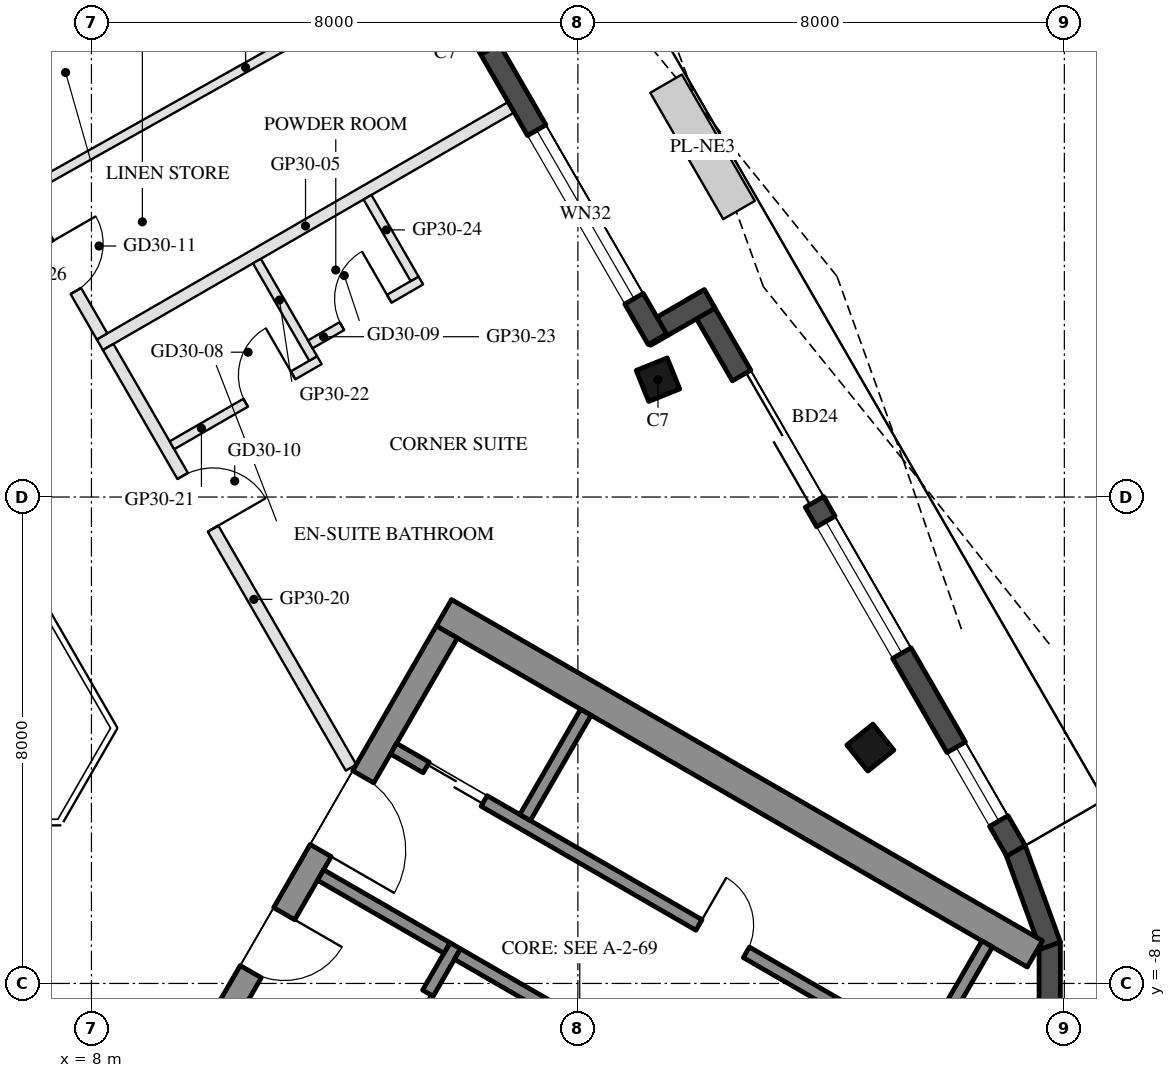
"""IFC4 building model, lengths in metres.
Left out: names, types, materials, properties, quantities, classifications, styles, units other than length and angle.
Written with IfcOpenShell. Run it as: python <this file> out.ifc"""

import sys

from ifc_helpers import new_model, si_unit, direction, frame, frame_2d, origin, origin_2d, place, context, subcontext, project, spatial, rectangle, hollow_rectangle, extrude, boolean, halfspace, element, fill, save


model = new_model("IFC4")
c1 = context("Model", 3, precision=1e-05, world=origin(), true_north=direction((0.0, 1.0)))
c2 = subcontext(c1, "Body", "Model", "MODEL_VIEW")
j1 = project(units=[si_unit("LENGTHUNIT", "METRE"), si_unit("PLANEANGLEUNIT", "RADIAN")], contexts=[c1])
p1 = place(None, origin())
s1 = spatial("IfcSite", under=j1, at=p1, CompositionType="ELEMENT")
p2 = place(p1, origin())
s2 = spatial("IfcBuilding", under=s1, at=p2, CompositionType="ELEMENT")
p3 = place(p2, frame((0.0, 0.0, 298.5)))
s3 = spatial("IfcBuildingStorey", under=s2, at=p3, CompositionType="ELEMENT", Elevation=298.5)
p4 = place(p3, frame((20.81, -4.121, 0.0), z_axis=(-0.190735837279, 0.02958801006, 0.981195388309), x_axis=(0.488489055842, -0.864137452388, 0.121016138189)))
e1 = element("IfcColumn", 1, at=p4, inside=s3, PredefinedType="COLUMN", context=c2, shape_type="SweptSolid", body=[
    boolean("DIFFERENCE", boolean("DIFFERENCE", extrude(hollow_rectangle(XDim=0.55, YDim=0.55, WallThickness=0.025, at=origin_2d()), origin(), (0.0, 0.0, 1.0), 3.771), halfspace(frame((0.0, 0.0, 0.04), z_axis=(0.0, 0.0, 1.0), x_axis=(1.0, 0.0, 0.0)), True)), halfspace(frame((0.0, 0.0, 3.731), z_axis=(0.0, 0.0, 1.0), x_axis=(1.0, 0.0, 0.0)), False)),
])
p5 = place(p3, frame((17.317, 1.93, 0.0), z_axis=(-0.161388759957, -0.022850929707, 0.98662632398), x_axis=(0.494767653448, -0.866891976592, 0.060854498787)))
e2 = element("IfcColumn", 2, at=p5, inside=s3, PredefinedType="COLUMN", context=c2, shape_type="SweptSolid", body=[
    boolean("DIFFERENCE", boolean("DIFFERENCE", extrude(hollow_rectangle(XDim=0.55, YDim=0.55, WallThickness=0.025, at=origin_2d()), origin(), (0.0, 0.0, 1.0), 3.75), halfspace(frame((0.0, 0.0, 0.034), z_axis=(0.0, 0.0, 1.0), x_axis=(1.0, 0.0, 0.0)), True)), halfspace(frame((0.0, 0.0, 3.716), z_axis=(0.0, 0.0, 1.0), x_axis=(1.0, 0.0, 0.0)), False)),
])
for number, where, z_axis, x_axis in (
    (3, (23.759, -9.008, 0.0), (0.0, 0.0, 1.0), (0.0, 1.0, 0.0)),
    (4, (23.77, -7.379, 0.0), (0.0, 0.0, 1.0), (-0.342, 0.94, 0.0)),
):
    element("IfcWall", number, at=place(p3, frame(where, z_axis=z_axis, x_axis=x_axis)), inside=s3, PredefinedType="SOLIDWALL", context=c2, shape_type="SweptSolid", body=[
        extrude(rectangle(XDim=1.689, YDim=0.35, at=frame_2d((0.845, 0.0))), origin(), (0.0, 0.0, 1.0), 3.55),
    ])
p6 = place(p3, frame((23.205, -5.819, 0.0), z_axis=(0.0, 0.0, 1.0), x_axis=(-0.500010118922, 0.866019561543, 0.0)))
e5 = element("IfcWall", 5, at=p6, inside=s3, PredefinedType="SOLIDWALL", context=c2, shape_type="SweptSolid", body=[
    extrude(rectangle(XDim=10.554, YDim=0.35, at=frame_2d((5.277, 0.0))), origin(), (0.0, 0.0, 1.0), 3.55),
])
p7 = place(p6, frame((0.566, 0.0, 0.3)))
e6 = element("IfcOpeningElement", 6, at=p7, cuts=e5, PredefinedType="OPENING", context=c2, shape_type="SweptSolid", body=[
    extrude(rectangle(XDim=1.4, YDim=2.65, at=frame_2d((0.7, 1.325))), frame((0.0, 0.185, 0.0), z_axis=(0.0, -1.0, 0.0), x_axis=(1.0, 0.0, 0.0)), (0.0, 0.0, 1.0), 0.37),
])
p8 = place(p6, frame((6.626, 0.0, 0.0)))
e7 = element("IfcOpeningElement", 7, at=p8, cuts=e5, PredefinedType="OPENING", context=c2, shape_type="SweptSolid", body=[
    extrude(rectangle(XDim=2.4, YDim=2.4, at=frame_2d((1.2, 1.2))), frame((0.0, 0.185, 0.0), z_axis=(0.0, -1.0, 0.0), x_axis=(1.0, 0.0, 0.0)), (0.0, 0.0, 1.0), 0.37),
])
p9 = place(p6, frame((3.754, 0.0, 0.3)))
e8 = element("IfcOpeningElement", 8, at=p9, cuts=e5, PredefinedType="OPENING", context=c2, shape_type="SweptSolid", body=[
    extrude(rectangle(XDim=2.5, YDim=2.65, at=frame_2d((1.25, 1.325))), frame((0.0, 0.185, 0.0), z_axis=(0.0, -1.0, 0.0), x_axis=(1.0, 0.0, 0.0)), (0.0, 0.0, 1.0), 0.37),
])
p10 = place(p3, frame((18.167, 3.258, 0.0), z_axis=(0.0, 0.0, 1.0), x_axis=(-0.866005645448, -0.500034220881, 0.0)))
e9 = element("IfcWall", 9, at=p10, inside=s3, PredefinedType="SOLIDWALL", context=c2, shape_type="SweptSolid", body=[
    extrude(rectangle(XDim=1.22, YDim=0.35, at=frame_2d((0.61, 0.0))), origin(), (0.0, 0.0, 1.0), 3.55),
])
p11 = place(p3, frame((17.308, 2.595, 0.0), z_axis=(0.0, 0.0, 1.0), x_axis=(-0.500005339912, 0.866022320763, 0.0)))
e10 = element("IfcWall", 10, at=p11, inside=s3, PredefinedType="SOLIDWALL", context=c2, shape_type="SweptSolid", body=[
    extrude(rectangle(XDim=5.827, YDim=0.35, at=frame_2d((2.914, 0.0))), origin(), (0.0, 0.0, 1.0), 3.55),
])
p12 = place(p11, frame((0.77, 0.0, 0.3)))
e11 = element("IfcOpeningElement", 11, at=p12, cuts=e10, PredefinedType="OPENING", context=c2, shape_type="SweptSolid", body=[
    extrude(rectangle(XDim=3.2, YDim=2.65, at=frame_2d((1.6, 1.325))), frame((0.0, 0.185, 0.0), z_axis=(0.0, -1.0, 0.0), x_axis=(1.0, 0.0, 0.0)), (0.0, 0.0, 1.0), 0.37),
])
p13 = place(p3, frame((14.342, 7.443, 0.0), z_axis=(0.0, 0.0, 1.0), x_axis=(0.866092288191, 0.499884134912, 0.0)))
e12 = element("IfcWall", 12, at=p13, inside=s3, PredefinedType="SOLIDWALL", context=c2, shape_type="SweptSolid", body=[
    extrude(rectangle(XDim=1.22, YDim=0.35, at=frame_2d((0.61, 0.0))), origin(), (0.0, 0.0, 1.0), 3.55),
])
p14 = place(p3, frame((13.797, -1.903, 0.0), z_axis=(0.0, 0.0, 1.0), x_axis=(0.866025449148, -0.499999921427, 0.0)))
e13 = element("IfcWall", 13, at=p14, inside=s3, PredefinedType="SHEAR", context=c2, shape_type="SweptSolid", body=[
    extrude(rectangle(XDim=11.222, YDim=0.5, at=frame_2d((5.611, 0.0))), origin(), (0.0, 0.0, 1.0), 3.5),
])
p15 = place(p3, frame((8.845, -10.88, 0.0), z_axis=(0.0, 0.0, 1.0), x_axis=(0.500004234368, 0.866022959057, 0.0)))
e14 = element("IfcWall", 14, at=p15, inside=s3, PredefinedType="SHEAR", context=c2, shape_type="SweptSolid", body=[
    extrude(rectangle(XDim=10.0, YDim=0.4, at=frame_2d((5.0, 0.0))), origin(), (0.0, 0.0, 1.0), 3.5),
])
p16 = place(p15, frame((3.55, 0.0, 0.0)))
e15 = element("IfcOpeningElement", 15, at=p16, cuts=e14, PredefinedType="OPENING", context=c2, shape_type="SweptSolid", body=[
    extrude(rectangle(XDim=1.1, YDim=2.1, at=frame_2d((0.55, 1.05))), frame((0.0, 0.21, 0.0), z_axis=(0.0, -1.0, 0.0), x_axis=(1.0, 0.0, 0.0)), (0.0, 0.0, 1.0), 0.42),
])
p17 = place(p15, frame((5.85, 0.0, 0.0)))
e16 = element("IfcOpeningElement", 16, at=p17, cuts=e14, PredefinedType="OPENING", context=c2, shape_type="SweptSolid", body=[
    extrude(rectangle(XDim=1.4, YDim=2.1, at=frame_2d((0.7, 1.05))), frame((0.0, 0.21, 0.0), z_axis=(0.0, -1.0, 0.0), x_axis=(1.0, 0.0, 0.0)), (0.0, 0.0, 1.0), 0.42),
])
p18 = place(p3, frame((12.583, -9.805, 0.0), z_axis=(0.0, 0.0, 1.0), x_axis=(0.49994636267, 0.866056369097, 0.0)))
e17 = element("IfcWall", 17, at=p18, inside=s3, PredefinedType="SHEAR", context=c2, shape_type="SweptSolid", body=[
    extrude(rectangle(XDim=2.8, YDim=0.2, at=frame_2d((1.4, 0.0))), origin(), (0.0, 0.0, 1.0), 3.5),
])
p19 = place(p18, frame((0.7, 0.0, 0.0)))
e18 = element("IfcOpeningElement", 18, at=p19, cuts=e17, PredefinedType="OPENING", context=c2, shape_type="SweptSolid", body=[
    extrude(rectangle(XDim=1.2, YDim=2.1, at=frame_2d((0.6, 1.05))), frame((0.0, 0.11, 0.0), z_axis=(0.0, -1.0, 0.0), x_axis=(1.0, 0.0, 0.0)), (0.0, 0.0, 1.0), 0.22),
])
p20 = place(p3, frame((11.768, -6.217, 0.0), z_axis=(0.0, 0.0, 1.0), x_axis=(0.866050077142, -0.499957262057, 0.0)))
e19 = element("IfcWall", 19, at=p20, inside=s3, PredefinedType="SHEAR", context=c2, shape_type="SweptSolid", body=[
    extrude(rectangle(XDim=2.4, YDim=0.2, at=frame_2d((1.2, 0.0))), origin(), (0.0, 0.0, 1.0), 3.5),
])
p21 = place(p3, frame((14.02, -7.517, 0.0), z_axis=(0.0, 0.0, 1.0), x_axis=(0.866034573852, -0.49998411664, 0.0)))
e20 = element("IfcWall", 20, at=p21, inside=s3, PredefinedType="SHEAR", context=c2, shape_type="SweptSolid", body=[
    extrude(rectangle(XDim=2.8, YDim=0.2, at=frame_2d((1.4, 0.0))), origin(), (0.0, 0.0, 1.0), 3.5),
])
p22 = place(p3, frame((12.968, -4.138, 0.0), z_axis=(0.0, 0.0, 1.0), x_axis=(0.866028328073, -0.49999493495, 0.0)))
e21 = element("IfcWall", 21, at=p22, inside=s3, PredefinedType="SHEAR", context=c2, shape_type="SweptSolid", body=[
    extrude(rectangle(XDim=10.16, YDim=0.2, at=frame_2d((5.08, 0.0))), origin(), (0.0, 0.0, 1.0), 3.5),
])
p23 = place(p22, frame((0.62, 0.0, 0.0)))
e22 = element("IfcOpeningElement", 22, at=p23, cuts=e21, PredefinedType="OPENING", context=c2, shape_type="SweptSolid", body=[
    extrude(rectangle(XDim=1.1, YDim=2.1, at=frame_2d((0.55, 1.05))), frame((0.0, 0.11, 0.0), z_axis=(0.0, -1.0, 0.0), x_axis=(1.0, 0.0, 0.0)), (0.0, 0.0, 1.0), 0.22),
])
p24 = place(p22, frame((5.8, 0.0, 0.0)))
e23 = element("IfcOpeningElement", 23, at=p24, cuts=e21, PredefinedType="OPENING", context=c2, shape_type="SweptSolid", body=[
    extrude(rectangle(XDim=0.9, YDim=2.1, at=frame_2d((0.45, 1.05))), frame((0.0, 0.11, 0.0), z_axis=(0.0, -1.0, 0.0), x_axis=(1.0, 0.0, 0.0)), (0.0, 0.0, 1.0), 0.22),
])
for number, where, z_axis, x_axis in (
    (24, (15.131, -5.272, 0.0), (0.0, 0.0, 1.0), (0.5, 0.866, 0.0)),
    (25, (21.73, -9.082, 0.0), (0.0, 0.0, 1.0), (0.5, 0.866, 0.0)),
):
    element("IfcWall", number, at=place(p3, frame(where, z_axis=z_axis, x_axis=x_axis)), inside=s3, PredefinedType="SHEAR", context=c2, shape_type="SweptSolid", body=[
        extrude(rectangle(XDim=2.0, YDim=0.2, at=frame_2d((1.0, 0.0))), origin(), (0.0, 0.0, 1.0), 3.5),
    ])
p25 = place(p3, frame((14.903, 6.41, 0.0), z_axis=(0.0, 0.0, 1.0), x_axis=(-0.866030491634, -0.499991187483, 0.0)))
e26 = element("IfcWall", 26, at=p25, inside=s3, PredefinedType="PARTITIONING", context=c2, shape_type="SweptSolid", body=[
    extrude(rectangle(XDim=7.812, YDim=0.2, at=frame_2d((3.906, 0.0))), origin(), (0.0, 0.0, 1.0), 3.1),
])
p26 = place(p3, frame((12.986, 11.531, 0.0), z_axis=(0.0, 0.0, 1.0), x_axis=(-0.877887007044, -0.478867834442, 0.0)))
e27 = element("IfcWall", 27, at=p26, inside=s3, PredefinedType="PARTITIONING", context=c2, shape_type="SweptSolid", body=[
    extrude(rectangle(XDim=8.714, YDim=0.2, at=frame_2d((4.357, 0.0))), origin(), (0.0, 0.0, 1.0), 3.1),
])
p27 = place(p3, frame((8.275, 2.468, 0.0), z_axis=(0.0, 0.0, 1.0), x_axis=(0.500004647933, -0.866022720283, 0.0)))
e28 = element("IfcWall", 28, at=p27, inside=s3, PredefinedType="PARTITIONING", context=c2, shape_type="SweptSolid", body=[
    extrude(rectangle(XDim=7.988, YDim=0.2, at=frame_2d((3.994, 0.0))), origin(), (0.0, 0.0, 1.0), 3.1),
])
p28 = place(p27, frame((2.45, 0.0, 0.0)))
e29 = element("IfcOpeningElement", 29, at=p28, cuts=e28, PredefinedType="OPENING", context=c2, shape_type="SweptSolid", body=[
    extrude(rectangle(XDim=1.0, YDim=2.1, at=frame_2d((0.5, 1.05))), frame((0.0, 0.11, 0.0), z_axis=(0.0, -1.0, 0.0), x_axis=(1.0, 0.0, 0.0)), (0.0, 0.0, 1.0), 0.22),
])
p29 = place(p3, frame((9.324, 0.851, 0.0), z_axis=(0.0, 0.0, 1.0), x_axis=(0.865996816683, 0.500049511043, 0.0)))
e30 = element("IfcWall", 30, at=p29, inside=s3, PredefinedType="PARTITIONING", context=c2, shape_type="SweptSolid", body=[
    extrude(rectangle(XDim=2.8, YDim=0.15, at=frame_2d((1.4, 0.0))), origin(), (0.0, 0.0, 1.0), 3.55),
])
p30 = place(p29, frame((1.4, 0.0, 0.0)))
e31 = element("IfcOpeningElement", 31, at=p30, cuts=e30, PredefinedType="OPENING", context=c2, shape_type="SweptSolid", body=[
    extrude(rectangle(XDim=0.9, YDim=2.1, at=frame_2d((0.45, 1.05))), frame((0.0, 0.085, 0.0), z_axis=(0.0, -1.0, 0.0), x_axis=(1.0, 0.0, 0.0)), (0.0, 0.0, 1.0), 0.17),
])
p31 = place(p3, frame((11.646, 2.278, 0.0), z_axis=(0.0, 0.0, 1.0), x_axis=(-0.49994333299, 0.866058118026, 0.0)))
e32 = element("IfcWall", 32, at=p31, inside=s3, PredefinedType="PARTITIONING", context=c2, shape_type="SweptSolid", body=[
    extrude(rectangle(XDim=1.85, YDim=0.15, at=frame_2d((0.925, 0.0))), origin(), (0.0, 0.0, 1.0), 3.1),
])
p32 = place(p3, frame((11.599, 2.511, 0.0), z_axis=(0.0, 0.0, 1.0), x_axis=(0.866009402589, 0.500027713859, 0.0)))
e33 = element("IfcWall", 33, at=p32, inside=s3, PredefinedType="PARTITIONING", context=c2, shape_type="SweptSolid", body=[
    extrude(rectangle(XDim=2.1, YDim=0.15, at=frame_2d((1.05, 0.0))), origin(), (0.0, 0.0, 1.0), 3.55),
])
p33 = place(p32, frame((0.6, 0.0, 0.0)))
e34 = element("IfcOpeningElement", 34, at=p33, cuts=e33, PredefinedType="OPENING", context=c2, shape_type="SweptSolid", body=[
    extrude(rectangle(XDim=0.9, YDim=2.1, at=frame_2d((0.45, 1.05))), frame((0.0, 0.085, 0.0), z_axis=(0.0, -1.0, 0.0), x_axis=(1.0, 0.0, 0.0)), (0.0, 0.0, 1.0), 0.17),
])
p34 = place(p3, frame((13.315, 3.588, 0.0), z_axis=(0.0, 0.0, 1.0), x_axis=(-0.499967891604, 0.866043940782, 0.0)))
e35 = element("IfcWall", 35, at=p34, inside=s3, PredefinedType="PARTITIONING", context=c2, shape_type="SweptSolid", body=[
    extrude(rectangle(XDim=1.55, YDim=0.15, at=frame_2d((0.775, 0.0))), origin(), (0.0, 0.0, 1.0), 3.1),
])
p35 = place(p3, frame((14.334, 9.196, 0.0), z_axis=(0.0, 0.0, 1.0), x_axis=(-0.872016731473, -0.489476066863, 0.0)))
e36 = element("IfcWall", 36, at=p35, inside=s3, PredefinedType="PARTITIONING", context=c2, shape_type="SweptSolid", body=[
    extrude(rectangle(XDim=8.712, YDim=0.15, at=frame_2d((4.356, 0.0))), origin(), (0.0, 0.0, 1.0), 3.1),
])
p36 = place(p3, frame((6.862, 4.916, 0.0), z_axis=(0.0, 0.0, 1.0), x_axis=(0.499958506883, -0.866049358521, 0.0)))
e37 = element("IfcWall", 37, at=p36, inside=s3, PredefinedType="PARTITIONING", context=c2, shape_type="SweptSolid", body=[
    extrude(rectangle(XDim=2.626, YDim=0.2, at=frame_2d((1.313, 0.0))), origin(), (0.0, 0.0, 1.0), 3.1),
])
p37 = place(p36, frame((0.863, 0.0, 0.0)))
e38 = element("IfcOpeningElement", 38, at=p37, cuts=e37, PredefinedType="OPENING", context=c2, shape_type="SweptSolid", body=[
    extrude(rectangle(XDim=0.9, YDim=2.1, at=frame_2d((0.45, 1.05))), frame((0.0, 0.11, 0.0), z_axis=(0.0, -1.0, 0.0), x_axis=(1.0, 0.0, 0.0)), (0.0, 0.0, 1.0), 0.22),
])
p38 = place(p7, origin())
e39 = element("IfcWindow", 39, at=p38, inside=s3, PartitioningType="SINGLE_PANEL", PredefinedType="WINDOW", context=c2, shape_type="SweptSolid", body=[
    extrude(rectangle(XDim=1.4, YDim=2.65, at=frame_2d((0.7, 1.325))), frame((0.0, 0.03, 0.0), z_axis=(0.0, -1.0, 0.0), x_axis=(1.0, 0.0, 0.0)), (0.0, 0.0, 1.0), 0.06),
])
fill(e6, e39)
p39 = place(p8, frame((2.4, 0.0, 0.0), z_axis=(0.0, 0.0, 1.0), x_axis=(-1.0, 0.0, 0.0)))
e40 = element("IfcDoor", 40, at=p39, inside=s3, OperationType="SLIDING_TO_LEFT", PredefinedType="DOOR", context=c2, shape_type="SweptSolid", body=[
    extrude(rectangle(XDim=2.4, YDim=2.4, at=frame_2d((1.2, 1.2))), frame((0.0, 0.025, 0.0), z_axis=(0.0, -1.0, 0.0), x_axis=(1.0, 0.0, 0.0)), (0.0, 0.0, 1.0), 0.05),
])
fill(e7, e40)
p40 = place(p9, origin())
e41 = element("IfcWindow", 41, at=p40, inside=s3, PartitioningType="SINGLE_PANEL", PredefinedType="WINDOW", context=c2, shape_type="SweptSolid", body=[
    extrude(rectangle(XDim=2.5, YDim=2.65, at=frame_2d((1.25, 1.325))), frame((0.0, 0.03, 0.0), z_axis=(0.0, -1.0, 0.0), x_axis=(1.0, 0.0, 0.0)), (0.0, 0.0, 1.0), 0.06),
])
fill(e8, e41)
p41 = place(p12, origin())
e42 = element("IfcWindow", 42, at=p41, inside=s3, PartitioningType="SINGLE_PANEL", PredefinedType="WINDOW", context=c2, shape_type="SweptSolid", body=[
    extrude(rectangle(XDim=3.2, YDim=2.65, at=frame_2d((1.6, 1.325))), frame((0.0, 0.03, 0.0), z_axis=(0.0, -1.0, 0.0), x_axis=(1.0, 0.0, 0.0)), (0.0, 0.0, 1.0), 0.06),
])
fill(e11, e42)
p42 = place(p19, origin())
e43 = element("IfcDoor", 43, at=p42, inside=s3, OperationType="DOUBLE_DOOR_SLIDING", PredefinedType="DOOR", context=c2, shape_type="SweptSolid", body=[
    extrude(rectangle(XDim=1.2, YDim=2.1, at=frame_2d((0.6, 1.05))), frame((0.0, 0.025, 0.0), z_axis=(0.0, -1.0, 0.0), x_axis=(1.0, 0.0, 0.0)), (0.0, 0.0, 1.0), 0.05),
])
fill(e18, e43)
p43 = place(p23, origin())
e44 = element("IfcDoor", 44, at=p43, inside=s3, OperationType="DOUBLE_DOOR_SLIDING", PredefinedType="DOOR", context=c2, shape_type="SweptSolid", body=[
    extrude(rectangle(XDim=1.1, YDim=2.1, at=frame_2d((0.55, 1.05))), frame((0.0, 0.025, 0.0), z_axis=(0.0, -1.0, 0.0), x_axis=(1.0, 0.0, 0.0)), (0.0, 0.0, 1.0), 0.05),
])
fill(e22, e44)
p44 = place(p24, origin())
e45 = element("IfcDoor", 45, at=p44, inside=s3, OperationType="SINGLE_SWING_LEFT", PredefinedType="DOOR", context=c2, shape_type="SweptSolid", body=[
    extrude(rectangle(XDim=0.9, YDim=2.1, at=frame_2d((0.45, 1.05))), frame((0.0, 0.025, 0.0), z_axis=(0.0, -1.0, 0.0), x_axis=(1.0, 0.0, 0.0)), (0.0, 0.0, 1.0), 0.05),
])
fill(e23, e45)
p45 = place(p16, frame((1.1, 0.0, 0.0), z_axis=(0.0, 0.0, 1.0), x_axis=(-1.0, 0.0, 0.0)))
e46 = element("IfcDoor", 46, at=p45, inside=s3, OperationType="SINGLE_SWING_LEFT", PredefinedType="DOOR", context=c2, shape_type="SweptSolid", body=[
    extrude(rectangle(XDim=1.1, YDim=2.1, at=frame_2d((0.55, 1.05))), frame((0.0, 0.025, 0.0), z_axis=(0.0, -1.0, 0.0), x_axis=(1.0, 0.0, 0.0)), (0.0, 0.0, 1.0), 0.05),
])
fill(e15, e46)
p46 = place(p17, frame((1.4, 0.0, 0.0), z_axis=(0.0, 0.0, 1.0), x_axis=(-1.0, 0.0, 0.0)))
e47 = element("IfcDoor", 47, at=p46, inside=s3, OperationType="DOUBLE_DOOR_SINGLE_SWING", PredefinedType="DOOR", context=c2, shape_type="SweptSolid", body=[
    extrude(rectangle(XDim=1.4, YDim=2.1, at=frame_2d((0.7, 1.05))), frame((0.0, 0.025, 0.0), z_axis=(0.0, -1.0, 0.0), x_axis=(1.0, 0.0, 0.0)), (0.0, 0.0, 1.0), 0.05),
])
fill(e16, e47)
p47 = place(p30, origin())
e48 = element("IfcDoor", 48, at=p47, inside=s3, OperationType="SINGLE_SWING_RIGHT", PredefinedType="DOOR", context=c2, shape_type="SweptSolid", body=[
    extrude(rectangle(XDim=0.9, YDim=2.1, at=frame_2d((0.45, 1.05))), frame((0.0, 0.025, 0.0), z_axis=(0.0, -1.0, 0.0), x_axis=(1.0, 0.0, 0.0)), (0.0, 0.0, 1.0), 0.05),
])
fill(e31, e48)
p48 = place(p33, origin())
e49 = element("IfcDoor", 49, at=p48, inside=s3, OperationType="SINGLE_SWING_RIGHT", PredefinedType="DOOR", context=c2, shape_type="SweptSolid", body=[
    extrude(rectangle(XDim=0.9, YDim=2.1, at=frame_2d((0.45, 1.05))), frame((0.0, 0.025, 0.0), z_axis=(0.0, -1.0, 0.0), x_axis=(1.0, 0.0, 0.0)), (0.0, 0.0, 1.0), 0.05),
])
fill(e34, e49)
p49 = place(p28, origin())
e50 = element("IfcDoor", 50, at=p49, inside=s3, OperationType="SINGLE_SWING_RIGHT", PredefinedType="DOOR", context=c2, shape_type="SweptSolid", body=[
    extrude(rectangle(XDim=1.0, YDim=2.1, at=frame_2d((0.5, 1.05))), frame((0.0, 0.025, 0.0), z_axis=(0.0, -1.0, 0.0), x_axis=(1.0, 0.0, 0.0)), (0.0, 0.0, 1.0), 0.05),
])
fill(e29, e50)
p50 = place(p37, origin())
e51 = element("IfcDoor", 51, at=p50, inside=s3, OperationType="SINGLE_SWING_LEFT", PredefinedType="DOOR", context=c2, shape_type="SweptSolid", body=[
    extrude(rectangle(XDim=0.9, YDim=2.1, at=frame_2d((0.45, 1.05))), frame((0.0, 0.025, 0.0), z_axis=(0.0, -1.0, 0.0), x_axis=(1.0, 0.0, 0.0)), (0.0, 0.0, 1.0), 0.05),
])
fill(e38, e51)
save(model, sys.argv[1])
